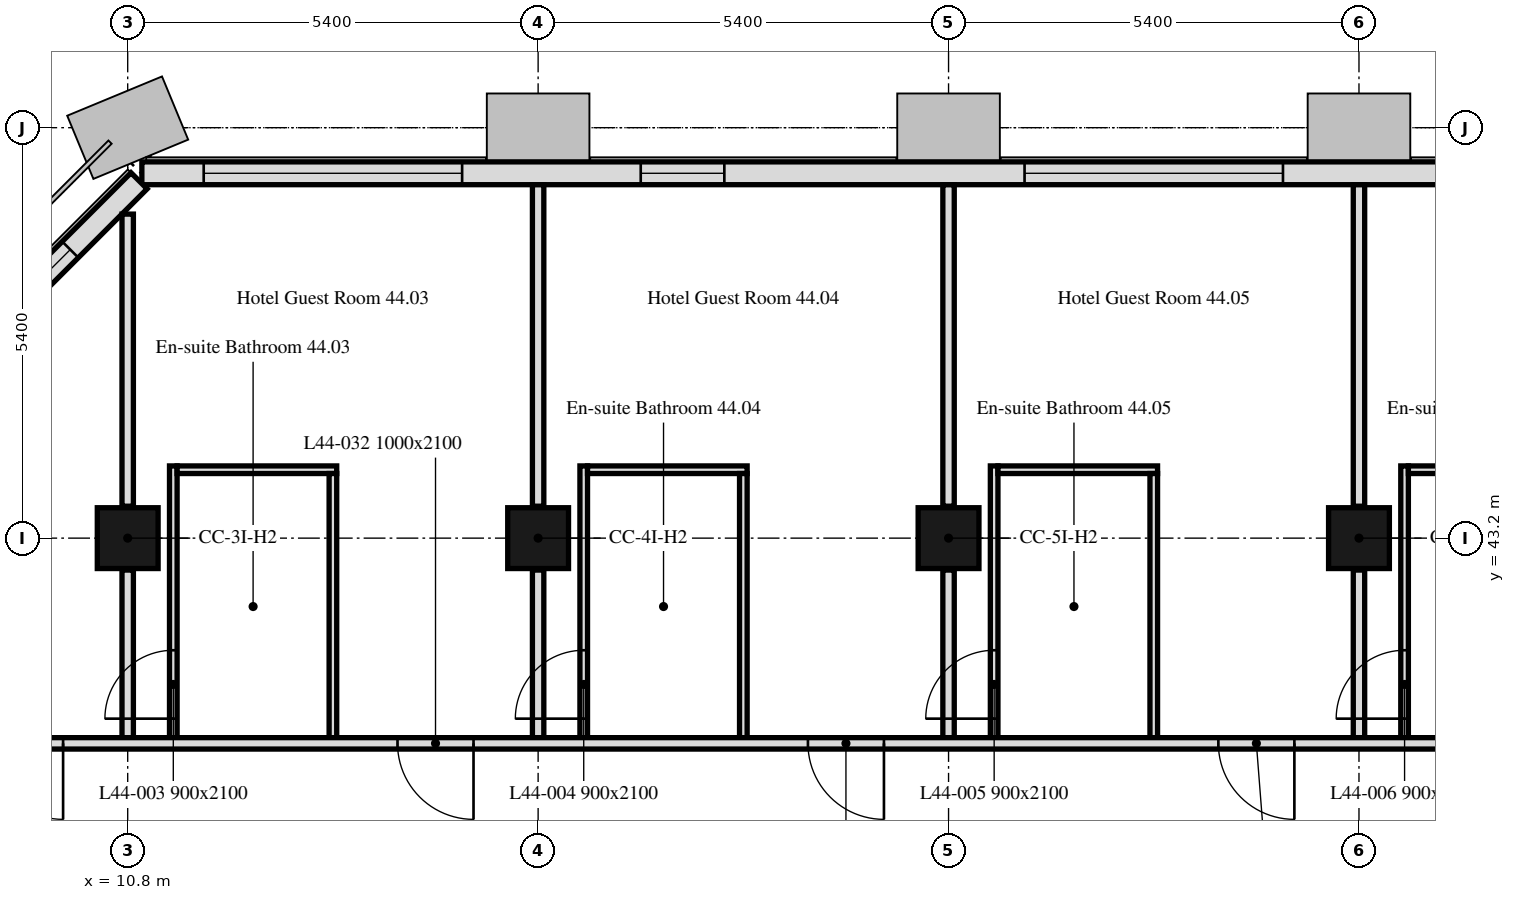
"""IFC4 building model, lengths in metres.
Left out: names, types, materials, properties, quantities, classifications, styles, units other than length and angle.
Written with IfcOpenShell. Run it as: python <this file> out.ifc"""

import sys

from ifc_helpers import new_model, si_unit, direction, frame, frame_2d, origin, origin_2d, place, context, subcontext, project, spatial, rectangle, extrude, element, fill, save


model = new_model("IFC4")
c1 = context("Model", 3, precision=1e-05, world=origin(), true_north=direction((0.0, 1.0)))
c2 = subcontext(c1, "Body", "Model", "MODEL_VIEW")
j1 = project(units=[si_unit("LENGTHUNIT", "METRE"), si_unit("PLANEANGLEUNIT", "RADIAN")], contexts=[c1])
p1 = place(None, origin())
s1 = spatial("IfcSite", under=j1, at=p1, CompositionType="ELEMENT")
p2 = place(p1, origin())
s2 = spatial("IfcBuilding", under=s1, at=p2, CompositionType="ELEMENT")
p3 = place(p2, frame((0.0, 0.0, 184.0)))
s3 = spatial("IfcBuildingStorey", under=s2, at=p3, CompositionType="ELEMENT", Elevation=184.0)
for number, where, z_axis, x_axis in (
    (1, (10.8, 43.2, 0.0), (0.0, 0.0, 1.0), (1.0, 0.0, 0.0)),
    (2, (16.2, 43.2, 0.0), (0.0, 0.0, 1.0), (1.0, 0.0, 0.0)),
    (3, (21.6, 43.2, 0.0), (0.0, 0.0, 1.0), (1.0, 0.0, 0.0)),
    (4, (27.0, 43.2, 0.0), (0.0, 0.0, 1.0), (1.0, 0.0, 0.0)),
):
    element("IfcColumn", number, at=place(p3, frame(where, z_axis=z_axis, x_axis=x_axis)), inside=s3, PredefinedType="COLUMN", context=c2, shape_type="SweptSolid", body=[
        extrude(rectangle(XDim=0.8, YDim=0.8, at=origin_2d()), origin(), (0.0, 0.0, 1.0), 3.0),
    ])
p4 = place(p3, frame((43.014, 48.0, 0.0), z_axis=(0.0, 0.0, 1.0), x_axis=(-1.0, 0.0, 0.0)))
e5 = element("IfcWall", 5, at=p4, inside=s3, PredefinedType="SOLIDWALL", context=c2, shape_type="SweptSolid", body=[
    extrude(rectangle(XDim=32.027, YDim=0.3, at=frame_2d((16.014, 0.0))), origin(), (0.0, 0.0, 1.0), 3.0),
])
p5 = place(p4, frame((2.764, 0.0, 0.9)))
e6 = element("IfcOpeningElement", 6, at=p5, cuts=e5, PredefinedType="OPENING", context=c2, shape_type="SweptSolid", body=[
    extrude(rectangle(XDim=1.1, YDim=1.7, at=frame_2d((0.55, 0.85))), frame((0.0, 0.16, 0.0), z_axis=(0.0, -1.0, 0.0), x_axis=(1.0, 0.0, 0.0)), (0.0, 0.0, 1.0), 0.32),
])
p6 = place(p4, frame((6.214, 0.0, 0.9)))
e7 = element("IfcOpeningElement", 7, at=p6, cuts=e5, PredefinedType="OPENING", context=c2, shape_type="SweptSolid", body=[
    extrude(rectangle(XDim=3.4, YDim=1.7, at=frame_2d((1.7, 0.85))), frame((0.0, 0.16, 0.0), z_axis=(0.0, -1.0, 0.0), x_axis=(1.0, 0.0, 0.0)), (0.0, 0.0, 1.0), 0.32),
])
p7 = place(p4, frame((13.564, 0.0, 0.9)))
e8 = element("IfcOpeningElement", 8, at=p7, cuts=e5, PredefinedType="OPENING", context=c2, shape_type="SweptSolid", body=[
    extrude(rectangle(XDim=1.1, YDim=1.7, at=frame_2d((0.55, 0.85))), frame((0.0, 0.16, 0.0), z_axis=(0.0, -1.0, 0.0), x_axis=(1.0, 0.0, 0.0)), (0.0, 0.0, 1.0), 0.32),
])
p8 = place(p4, frame((17.014, 0.0, 0.9)))
e9 = element("IfcOpeningElement", 9, at=p8, cuts=e5, PredefinedType="OPENING", context=c2, shape_type="SweptSolid", body=[
    extrude(rectangle(XDim=3.4, YDim=1.7, at=frame_2d((1.7, 0.85))), frame((0.0, 0.16, 0.0), z_axis=(0.0, -1.0, 0.0), x_axis=(1.0, 0.0, 0.0)), (0.0, 0.0, 1.0), 0.32),
])
p9 = place(p4, frame((24.364, 0.0, 0.9)))
e10 = element("IfcOpeningElement", 10, at=p9, cuts=e5, PredefinedType="OPENING", context=c2, shape_type="SweptSolid", body=[
    extrude(rectangle(XDim=1.1, YDim=1.7, at=frame_2d((0.55, 0.85))), frame((0.0, 0.16, 0.0), z_axis=(0.0, -1.0, 0.0), x_axis=(1.0, 0.0, 0.0)), (0.0, 0.0, 1.0), 0.32),
])
p10 = place(p4, frame((27.814, 0.0, 0.9)))
e11 = element("IfcOpeningElement", 11, at=p10, cuts=e5, PredefinedType="OPENING", context=c2, shape_type="SweptSolid", body=[
    extrude(rectangle(XDim=3.4, YDim=1.7, at=frame_2d((1.7, 0.85))), frame((0.0, 0.16, 0.0), z_axis=(0.0, -1.0, 0.0), x_axis=(1.0, 0.0, 0.0)), (0.0, 0.0, 1.0), 0.32),
])
p11 = place(p3, frame((10.949, 47.901, 0.0), z_axis=(0.0, 0.0, 1.0), x_axis=(-0.707106781187, -0.707106781187, 0.0)))
e12 = element("IfcWall", 12, at=p11, inside=s3, PredefinedType="SOLIDWALL", context=c2, shape_type="SweptSolid", body=[
    extrude(rectangle(XDim=6.86, YDim=0.3, at=frame_2d((3.43, 0.0))), origin(), (0.0, 0.0, 1.0), 3.0),
])
p12 = place(p11, frame((1.28, 0.0, 0.9)))
e13 = element("IfcOpeningElement", 13, at=p12, cuts=e12, PredefinedType="OPENING", context=c2, shape_type="SweptSolid", body=[
    extrude(rectangle(XDim=1.1, YDim=1.7, at=frame_2d((0.55, 0.85))), frame((0.0, 0.16, 0.0), z_axis=(0.0, -1.0, 0.0), x_axis=(1.0, 0.0, 0.0)), (0.0, 0.0, 1.0), 0.32),
])
p13 = place(p11, frame((4.48, 0.0, 0.9)))
e14 = element("IfcOpeningElement", 14, at=p13, cuts=e12, PredefinedType="OPENING", context=c2, shape_type="SweptSolid", body=[
    extrude(rectangle(XDim=1.1, YDim=1.7, at=frame_2d((0.55, 0.85))), frame((0.0, 0.16, 0.0), z_axis=(0.0, -1.0, 0.0), x_axis=(1.0, 0.0, 0.0)), (0.0, 0.0, 1.0), 0.32),
])
p14 = place(p3, frame((10.8, 40.575, 0.0), z_axis=(0.0, 0.0, 1.0), x_axis=(0.0, 1.0, 0.0)))
e15 = element("IfcWall", 15, at=p14, inside=s3, PredefinedType="PARTITIONING", context=c2, shape_type="SweptSolid", body=[
    extrude(rectangle(XDim=2.205, YDim=0.15, at=frame_2d((1.103, 0.0))), origin(), (0.0, 0.0, 1.0), 3.0),
])
p15 = place(p3, frame((10.8, 43.62, 0.0), z_axis=(0.0, 0.0, 1.0), x_axis=(0.0, 1.0, 0.0)))
e16 = element("IfcWall", 16, at=p15, inside=s3, PredefinedType="PARTITIONING", context=c2, shape_type="SweptSolid", body=[
    extrude(rectangle(XDim=3.843, YDim=0.15, at=frame_2d((1.921, 0.0))), origin(), (0.0, 0.0, 1.0), 3.0),
])
p16 = place(p3, frame((11.4, 40.575, 0.0), z_axis=(0.0, 0.0, 1.0), x_axis=(0.0, 1.0, 0.0)))
e17 = element("IfcWall", 17, at=p16, inside=s3, PredefinedType="PARTITIONING", context=c2, shape_type="SweptSolid", body=[
    extrude(rectangle(XDim=3.575, YDim=0.1, at=frame_2d((1.788, 0.0))), origin(), (0.0, 0.0, 1.0), 3.0),
])
p17 = place(p16, frame((0.25, 0.0, 0.0)))
e18 = element("IfcOpeningElement", 18, at=p17, cuts=e17, PredefinedType="OPENING", context=c2, shape_type="SweptSolid", body=[
    extrude(rectangle(XDim=0.9, YDim=2.1, at=frame_2d((0.45, 1.05))), frame((0.0, 0.05, 0.0), z_axis=(0.0, -1.0, 0.0), x_axis=(1.0, 0.0, 0.0)), (0.0, 0.0, 1.0), 0.1),
])
p18 = place(p3, frame((11.45, 44.1, 0.0), z_axis=(0.0, 0.0, 1.0), x_axis=(1.0, 0.0, 0.0)))
e19 = element("IfcWall", 19, at=p18, inside=s3, PredefinedType="PARTITIONING", context=c2, shape_type="SweptSolid", body=[
    extrude(rectangle(XDim=2.1, YDim=0.1, at=frame_2d((1.05, 0.0))), origin(), (0.0, 0.0, 1.0), 3.0),
])
p19 = place(p3, frame((13.5, 44.05, 0.0), z_axis=(0.0, 0.0, 1.0), x_axis=(0.0, -1.0, 0.0)))
e20 = element("IfcWall", 20, at=p19, inside=s3, PredefinedType="PARTITIONING", context=c2, shape_type="SweptSolid", body=[
    extrude(rectangle(XDim=3.475, YDim=0.1, at=frame_2d((1.738, 0.0))), origin(), (0.0, 0.0, 1.0), 3.0),
])
p20 = place(p3, frame((16.2, 40.575, 0.0), z_axis=(0.0, 0.0, 1.0), x_axis=(0.0, 1.0, 0.0)))
e21 = element("IfcWall", 21, at=p20, inside=s3, PredefinedType="PARTITIONING", context=c2, shape_type="SweptSolid", body=[
    extrude(rectangle(XDim=2.205, YDim=0.15, at=frame_2d((1.103, 0.0))), origin(), (0.0, 0.0, 1.0), 2.4),
])
p21 = place(p3, frame((16.2, 43.62, 0.0), z_axis=(0.0, 0.0, 1.0), x_axis=(0.0, 1.0, 0.0)))
e22 = element("IfcWall", 22, at=p21, inside=s3, PredefinedType="PARTITIONING", context=c2, shape_type="SweptSolid", body=[
    extrude(rectangle(XDim=4.229, YDim=0.15, at=frame_2d((2.115, 0.0))), origin(), (0.0, 0.0, 1.0), 2.4),
])
p22 = place(p3, frame((16.8, 40.575, 0.0), z_axis=(0.0, 0.0, 1.0), x_axis=(0.0, 1.0, 0.0)))
e23 = element("IfcWall", 23, at=p22, inside=s3, PredefinedType="PARTITIONING", context=c2, shape_type="SweptSolid", body=[
    extrude(rectangle(XDim=3.575, YDim=0.1, at=frame_2d((1.788, 0.0))), origin(), (0.0, 0.0, 1.0), 3.0),
])
p23 = place(p22, frame((0.25, 0.0, 0.0)))
e24 = element("IfcOpeningElement", 24, at=p23, cuts=e23, PredefinedType="OPENING", context=c2, shape_type="SweptSolid", body=[
    extrude(rectangle(XDim=0.9, YDim=2.1, at=frame_2d((0.45, 1.05))), frame((0.0, 0.05, 0.0), z_axis=(0.0, -1.0, 0.0), x_axis=(1.0, 0.0, 0.0)), (0.0, 0.0, 1.0), 0.1),
])
p24 = place(p3, frame((16.85, 44.1, 0.0), z_axis=(0.0, 0.0, 1.0), x_axis=(1.0, 0.0, 0.0)))
e25 = element("IfcWall", 25, at=p24, inside=s3, PredefinedType="PARTITIONING", context=c2, shape_type="SweptSolid", body=[
    extrude(rectangle(XDim=2.1, YDim=0.1, at=frame_2d((1.05, 0.0))), origin(), (0.0, 0.0, 1.0), 3.0),
])
p25 = place(p3, frame((18.9, 44.05, 0.0), z_axis=(0.0, 0.0, 1.0), x_axis=(0.0, -1.0, 0.0)))
e26 = element("IfcWall", 26, at=p25, inside=s3, PredefinedType="PARTITIONING", context=c2, shape_type="SweptSolid", body=[
    extrude(rectangle(XDim=3.475, YDim=0.1, at=frame_2d((1.738, 0.0))), origin(), (0.0, 0.0, 1.0), 3.0),
])
p26 = place(p3, frame((21.6, 40.575, 0.0), z_axis=(0.0, 0.0, 1.0), x_axis=(0.0, 1.0, 0.0)))
e27 = element("IfcWall", 27, at=p26, inside=s3, PredefinedType="PARTITIONING", context=c2, shape_type="SweptSolid", body=[
    extrude(rectangle(XDim=2.205, YDim=0.15, at=frame_2d((1.103, 0.0))), origin(), (0.0, 0.0, 1.0), 2.4),
])
p27 = place(p3, frame((21.6, 43.62, 0.0), z_axis=(0.0, 0.0, 1.0), x_axis=(0.0, 1.0, 0.0)))
e28 = element("IfcWall", 28, at=p27, inside=s3, PredefinedType="PARTITIONING", context=c2, shape_type="SweptSolid", body=[
    extrude(rectangle(XDim=4.229, YDim=0.15, at=frame_2d((2.115, 0.0))), origin(), (0.0, 0.0, 1.0), 2.4),
])
p28 = place(p3, frame((22.2, 40.575, 0.0), z_axis=(0.0, 0.0, 1.0), x_axis=(0.0, 1.0, 0.0)))
e29 = element("IfcWall", 29, at=p28, inside=s3, PredefinedType="PARTITIONING", context=c2, shape_type="SweptSolid", body=[
    extrude(rectangle(XDim=3.575, YDim=0.1, at=frame_2d((1.788, 0.0))), origin(), (0.0, 0.0, 1.0), 3.0),
])
p29 = place(p28, frame((0.25, 0.0, 0.0)))
e30 = element("IfcOpeningElement", 30, at=p29, cuts=e29, PredefinedType="OPENING", context=c2, shape_type="SweptSolid", body=[
    extrude(rectangle(XDim=0.9, YDim=2.1, at=frame_2d((0.45, 1.05))), frame((0.0, 0.05, 0.0), z_axis=(0.0, -1.0, 0.0), x_axis=(1.0, 0.0, 0.0)), (0.0, 0.0, 1.0), 0.1),
])
p30 = place(p3, frame((22.25, 44.1, 0.0), z_axis=(0.0, 0.0, 1.0), x_axis=(1.0, 0.0, 0.0)))
e31 = element("IfcWall", 31, at=p30, inside=s3, PredefinedType="PARTITIONING", context=c2, shape_type="SweptSolid", body=[
    extrude(rectangle(XDim=2.1, YDim=0.1, at=frame_2d((1.05, 0.0))), origin(), (0.0, 0.0, 1.0), 3.0),
])
p31 = place(p3, frame((24.3, 44.05, 0.0), z_axis=(0.0, 0.0, 1.0), x_axis=(0.0, -1.0, 0.0)))
e32 = element("IfcWall", 32, at=p31, inside=s3, PredefinedType="PARTITIONING", context=c2, shape_type="SweptSolid", body=[
    extrude(rectangle(XDim=3.475, YDim=0.1, at=frame_2d((1.738, 0.0))), origin(), (0.0, 0.0, 1.0), 3.0),
])
p32 = place(p3, frame((27.0, 40.575, 0.0), z_axis=(0.0, 0.0, 1.0), x_axis=(0.0, 1.0, 0.0)))
e33 = element("IfcWall", 33, at=p32, inside=s3, PredefinedType="PARTITIONING", context=c2, shape_type="SweptSolid", body=[
    extrude(rectangle(XDim=2.205, YDim=0.15, at=frame_2d((1.103, 0.0))), origin(), (0.0, 0.0, 1.0), 2.4),
])
p33 = place(p3, frame((27.0, 43.62, 0.0), z_axis=(0.0, 0.0, 1.0), x_axis=(0.0, 1.0, 0.0)))
e34 = element("IfcWall", 34, at=p33, inside=s3, PredefinedType="PARTITIONING", context=c2, shape_type="SweptSolid", body=[
    extrude(rectangle(XDim=4.229, YDim=0.15, at=frame_2d((2.115, 0.0))), origin(), (0.0, 0.0, 1.0), 2.4),
])
p34 = place(p3, frame((27.6, 40.575, 0.0), z_axis=(0.0, 0.0, 1.0), x_axis=(0.0, 1.0, 0.0)))
e35 = element("IfcWall", 35, at=p34, inside=s3, PredefinedType="PARTITIONING", context=c2, shape_type="SweptSolid", body=[
    extrude(rectangle(XDim=3.575, YDim=0.1, at=frame_2d((1.788, 0.0))), origin(), (0.0, 0.0, 1.0), 3.0),
])
p35 = place(p34, frame((0.25, 0.0, 0.0)))
e36 = element("IfcOpeningElement", 36, at=p35, cuts=e35, PredefinedType="OPENING", context=c2, shape_type="SweptSolid", body=[
    extrude(rectangle(XDim=0.9, YDim=2.1, at=frame_2d((0.45, 1.05))), frame((0.0, 0.05, 0.0), z_axis=(0.0, -1.0, 0.0), x_axis=(1.0, 0.0, 0.0)), (0.0, 0.0, 1.0), 0.1),
])
p36 = place(p3, frame((27.65, 44.1, 0.0), z_axis=(0.0, 0.0, 1.0), x_axis=(1.0, 0.0, 0.0)))
e37 = element("IfcWall", 37, at=p36, inside=s3, PredefinedType="PARTITIONING", context=c2, shape_type="SweptSolid", body=[
    extrude(rectangle(XDim=2.1, YDim=0.1, at=frame_2d((1.05, 0.0))), origin(), (0.0, 0.0, 1.0), 3.0),
])
p37 = place(p3, frame((47.849, 40.5, 0.0), z_axis=(0.0, 0.0, 1.0), x_axis=(-1.0, 0.0, 0.0)))
e38 = element("IfcWall", 38, at=p37, inside=s3, PredefinedType="PARTITIONING", context=c2, shape_type="SweptSolid", body=[
    extrude(rectangle(XDim=41.698, YDim=0.15, at=frame_2d((20.849, 0.0))), origin(), (0.0, 0.0, 1.0), 2.4),
])
p38 = place(p37, frame((37.899, 0.0, 0.0)))
e39 = element("IfcOpeningElement", 39, at=p38, cuts=e38, PredefinedType="OPENING", context=c2, shape_type="SweptSolid", body=[
    extrude(rectangle(XDim=1.0, YDim=2.1, at=frame_2d((0.5, 1.05))), frame((0.0, 0.075, 0.0), z_axis=(0.0, -1.0, 0.0), x_axis=(1.0, 0.0, 0.0)), (0.0, 0.0, 1.0), 0.15),
])
p39 = place(p37, frame((32.499, 0.0, 0.0)))
e40 = element("IfcOpeningElement", 40, at=p39, cuts=e38, PredefinedType="OPENING", context=c2, shape_type="SweptSolid", body=[
    extrude(rectangle(XDim=1.0, YDim=2.1, at=frame_2d((0.5, 1.05))), frame((0.0, 0.075, 0.0), z_axis=(0.0, -1.0, 0.0), x_axis=(1.0, 0.0, 0.0)), (0.0, 0.0, 1.0), 0.15),
])
p40 = place(p37, frame((27.099, 0.0, 0.0)))
e41 = element("IfcOpeningElement", 41, at=p40, cuts=e38, PredefinedType="OPENING", context=c2, shape_type="SweptSolid", body=[
    extrude(rectangle(XDim=1.0, YDim=2.1, at=frame_2d((0.5, 1.05))), frame((0.0, 0.075, 0.0), z_axis=(0.0, -1.0, 0.0), x_axis=(1.0, 0.0, 0.0)), (0.0, 0.0, 1.0), 0.15),
])
p41 = place(p37, frame((21.699, 0.0, 0.0)))
e42 = element("IfcOpeningElement", 42, at=p41, cuts=e38, PredefinedType="OPENING", context=c2, shape_type="SweptSolid", body=[
    extrude(rectangle(XDim=1.0, YDim=2.1, at=frame_2d((0.5, 1.05))), frame((0.0, 0.075, 0.0), z_axis=(0.0, -1.0, 0.0), x_axis=(1.0, 0.0, 0.0)), (0.0, 0.0, 1.0), 0.15),
])
p42 = place(p37, frame((16.299, 0.0, 0.0)))
e43 = element("IfcOpeningElement", 43, at=p42, cuts=e38, PredefinedType="OPENING", context=c2, shape_type="SweptSolid", body=[
    extrude(rectangle(XDim=1.0, YDim=2.1, at=frame_2d((0.5, 1.05))), frame((0.0, 0.075, 0.0), z_axis=(0.0, -1.0, 0.0), x_axis=(1.0, 0.0, 0.0)), (0.0, 0.0, 1.0), 0.15),
])
p43 = place(p37, frame((10.899, 0.0, 0.0)))
e44 = element("IfcOpeningElement", 44, at=p43, cuts=e38, PredefinedType="OPENING", context=c2, shape_type="SweptSolid", body=[
    extrude(rectangle(XDim=1.0, YDim=2.1, at=frame_2d((0.5, 1.05))), frame((0.0, 0.075, 0.0), z_axis=(0.0, -1.0, 0.0), x_axis=(1.0, 0.0, 0.0)), (0.0, 0.0, 1.0), 0.15),
])
p44 = place(p37, frame((2.849, 0.0, 0.0)))
e45 = element("IfcOpeningElement", 45, at=p44, cuts=e38, PredefinedType="OPENING", context=c2, shape_type="SweptSolid", body=[
    extrude(rectangle(XDim=1.0, YDim=2.1, at=frame_2d((0.5, 1.05))), frame((0.0, 0.075, 0.0), z_axis=(0.0, -1.0, 0.0), x_axis=(1.0, 0.0, 0.0)), (0.0, 0.0, 1.0), 0.15),
])
p45 = place(p8, origin())
e46 = element("IfcWindow", 46, at=p45, inside=s3, PartitioningType="SINGLE_PANEL", PredefinedType="WINDOW", context=c2, shape_type="SweptSolid", body=[
    extrude(rectangle(XDim=3.4, YDim=1.7, at=frame_2d((1.7, 0.85))), frame((0.0, 0.03, 0.0), z_axis=(0.0, -1.0, 0.0), x_axis=(1.0, 0.0, 0.0)), (0.0, 0.0, 1.0), 0.06),
])
fill(e9, e46)
p46 = place(p9, origin())
e47 = element("IfcWindow", 47, at=p46, inside=s3, PartitioningType="SINGLE_PANEL", PredefinedType="WINDOW", context=c2, shape_type="SweptSolid", body=[
    extrude(rectangle(XDim=1.1, YDim=1.7, at=frame_2d((0.55, 0.85))), frame((0.0, 0.03, 0.0), z_axis=(0.0, -1.0, 0.0), x_axis=(1.0, 0.0, 0.0)), (0.0, 0.0, 1.0), 0.06),
])
fill(e10, e47)
p47 = place(p10, origin())
e48 = element("IfcWindow", 48, at=p47, inside=s3, PartitioningType="SINGLE_PANEL", PredefinedType="WINDOW", context=c2, shape_type="SweptSolid", body=[
    extrude(rectangle(XDim=3.4, YDim=1.7, at=frame_2d((1.7, 0.85))), frame((0.0, 0.03, 0.0), z_axis=(0.0, -1.0, 0.0), x_axis=(1.0, 0.0, 0.0)), (0.0, 0.0, 1.0), 0.06),
])
fill(e11, e48)
p48 = place(p12, origin())
e49 = element("IfcWindow", 49, at=p48, inside=s3, PartitioningType="SINGLE_PANEL", PredefinedType="WINDOW", context=c2, shape_type="SweptSolid", body=[
    extrude(rectangle(XDim=1.1, YDim=1.7, at=frame_2d((0.55, 0.85))), frame((0.0, 0.03, 0.0), z_axis=(0.0, -1.0, 0.0), x_axis=(1.0, 0.0, 0.0)), (0.0, 0.0, 1.0), 0.06),
])
fill(e13, e49)
p49 = place(p17, origin())
e50 = element("IfcDoor", 50, at=p49, inside=s3, OperationType="SINGLE_SWING_LEFT", PredefinedType="DOOR", context=c2, shape_type="SweptSolid", body=[
    extrude(rectangle(XDim=0.9, YDim=2.1, at=frame_2d((0.45, 1.05))), frame((0.0, 0.025, 0.0), z_axis=(0.0, -1.0, 0.0), x_axis=(1.0, 0.0, 0.0)), (0.0, 0.0, 1.0), 0.05),
])
fill(e18, e50)
p50 = place(p23, origin())
e51 = element("IfcDoor", 51, at=p50, inside=s3, OperationType="SINGLE_SWING_RIGHT", PredefinedType="DOOR", context=c2, shape_type="SweptSolid", body=[
    extrude(rectangle(XDim=0.9, YDim=2.1, at=frame_2d((0.45, 1.05))), frame((0.0, 0.025, 0.0), z_axis=(0.0, -1.0, 0.0), x_axis=(1.0, 0.0, 0.0)), (0.0, 0.0, 1.0), 0.05),
])
fill(e24, e51)
p51 = place(p29, origin())
e52 = element("IfcDoor", 52, at=p51, inside=s3, OperationType="SINGLE_SWING_RIGHT", PredefinedType="DOOR", context=c2, shape_type="SweptSolid", body=[
    extrude(rectangle(XDim=0.9, YDim=2.1, at=frame_2d((0.45, 1.05))), frame((0.0, 0.025, 0.0), z_axis=(0.0, -1.0, 0.0), x_axis=(1.0, 0.0, 0.0)), (0.0, 0.0, 1.0), 0.05),
])
fill(e30, e52)
p52 = place(p35, origin())
e53 = element("IfcDoor", 53, at=p52, inside=s3, OperationType="SINGLE_SWING_LEFT", PredefinedType="DOOR", context=c2, shape_type="SweptSolid", body=[
    extrude(rectangle(XDim=0.9, YDim=2.1, at=frame_2d((0.45, 1.05))), frame((0.0, 0.025, 0.0), z_axis=(0.0, -1.0, 0.0), x_axis=(1.0, 0.0, 0.0)), (0.0, 0.0, 1.0), 0.05),
])
fill(e36, e53)
p53 = place(p38, origin())
e54 = element("IfcDoor", 54, at=p53, inside=s3, OperationType="SINGLE_SWING_LEFT", PredefinedType="DOOR", context=c2, shape_type="SweptSolid", body=[
    extrude(rectangle(XDim=1.0, YDim=2.1, at=frame_2d((0.5, 1.05))), frame((0.0, 0.025, 0.0), z_axis=(0.0, -1.0, 0.0), x_axis=(1.0, 0.0, 0.0)), (0.0, 0.0, 1.0), 0.05),
])
fill(e39, e54)
p54 = place(p39, origin())
e55 = element("IfcDoor", 55, at=p54, inside=s3, OperationType="SINGLE_SWING_RIGHT", PredefinedType="DOOR", context=c2, shape_type="SweptSolid", body=[
    extrude(rectangle(XDim=1.0, YDim=2.1, at=frame_2d((0.5, 1.05))), frame((0.0, 0.025, 0.0), z_axis=(0.0, -1.0, 0.0), x_axis=(1.0, 0.0, 0.0)), (0.0, 0.0, 1.0), 0.05),
])
fill(e40, e55)
p55 = place(p40, origin())
e56 = element("IfcDoor", 56, at=p55, inside=s3, OperationType="SINGLE_SWING_RIGHT", PredefinedType="DOOR", context=c2, shape_type="SweptSolid", body=[
    extrude(rectangle(XDim=1.0, YDim=2.1, at=frame_2d((0.5, 1.05))), frame((0.0, 0.025, 0.0), z_axis=(0.0, -1.0, 0.0), x_axis=(1.0, 0.0, 0.0)), (0.0, 0.0, 1.0), 0.05),
])
fill(e41, e56)
p56 = place(p41, origin())
e57 = element("IfcDoor", 57, at=p56, inside=s3, OperationType="SINGLE_SWING_LEFT", PredefinedType="DOOR", context=c2, shape_type="SweptSolid", body=[
    extrude(rectangle(XDim=1.0, YDim=2.1, at=frame_2d((0.5, 1.05))), frame((0.0, 0.025, 0.0), z_axis=(0.0, -1.0, 0.0), x_axis=(1.0, 0.0, 0.0)), (0.0, 0.0, 1.0), 0.05),
])
fill(e42, e57)
save(model, sys.argv[1])
